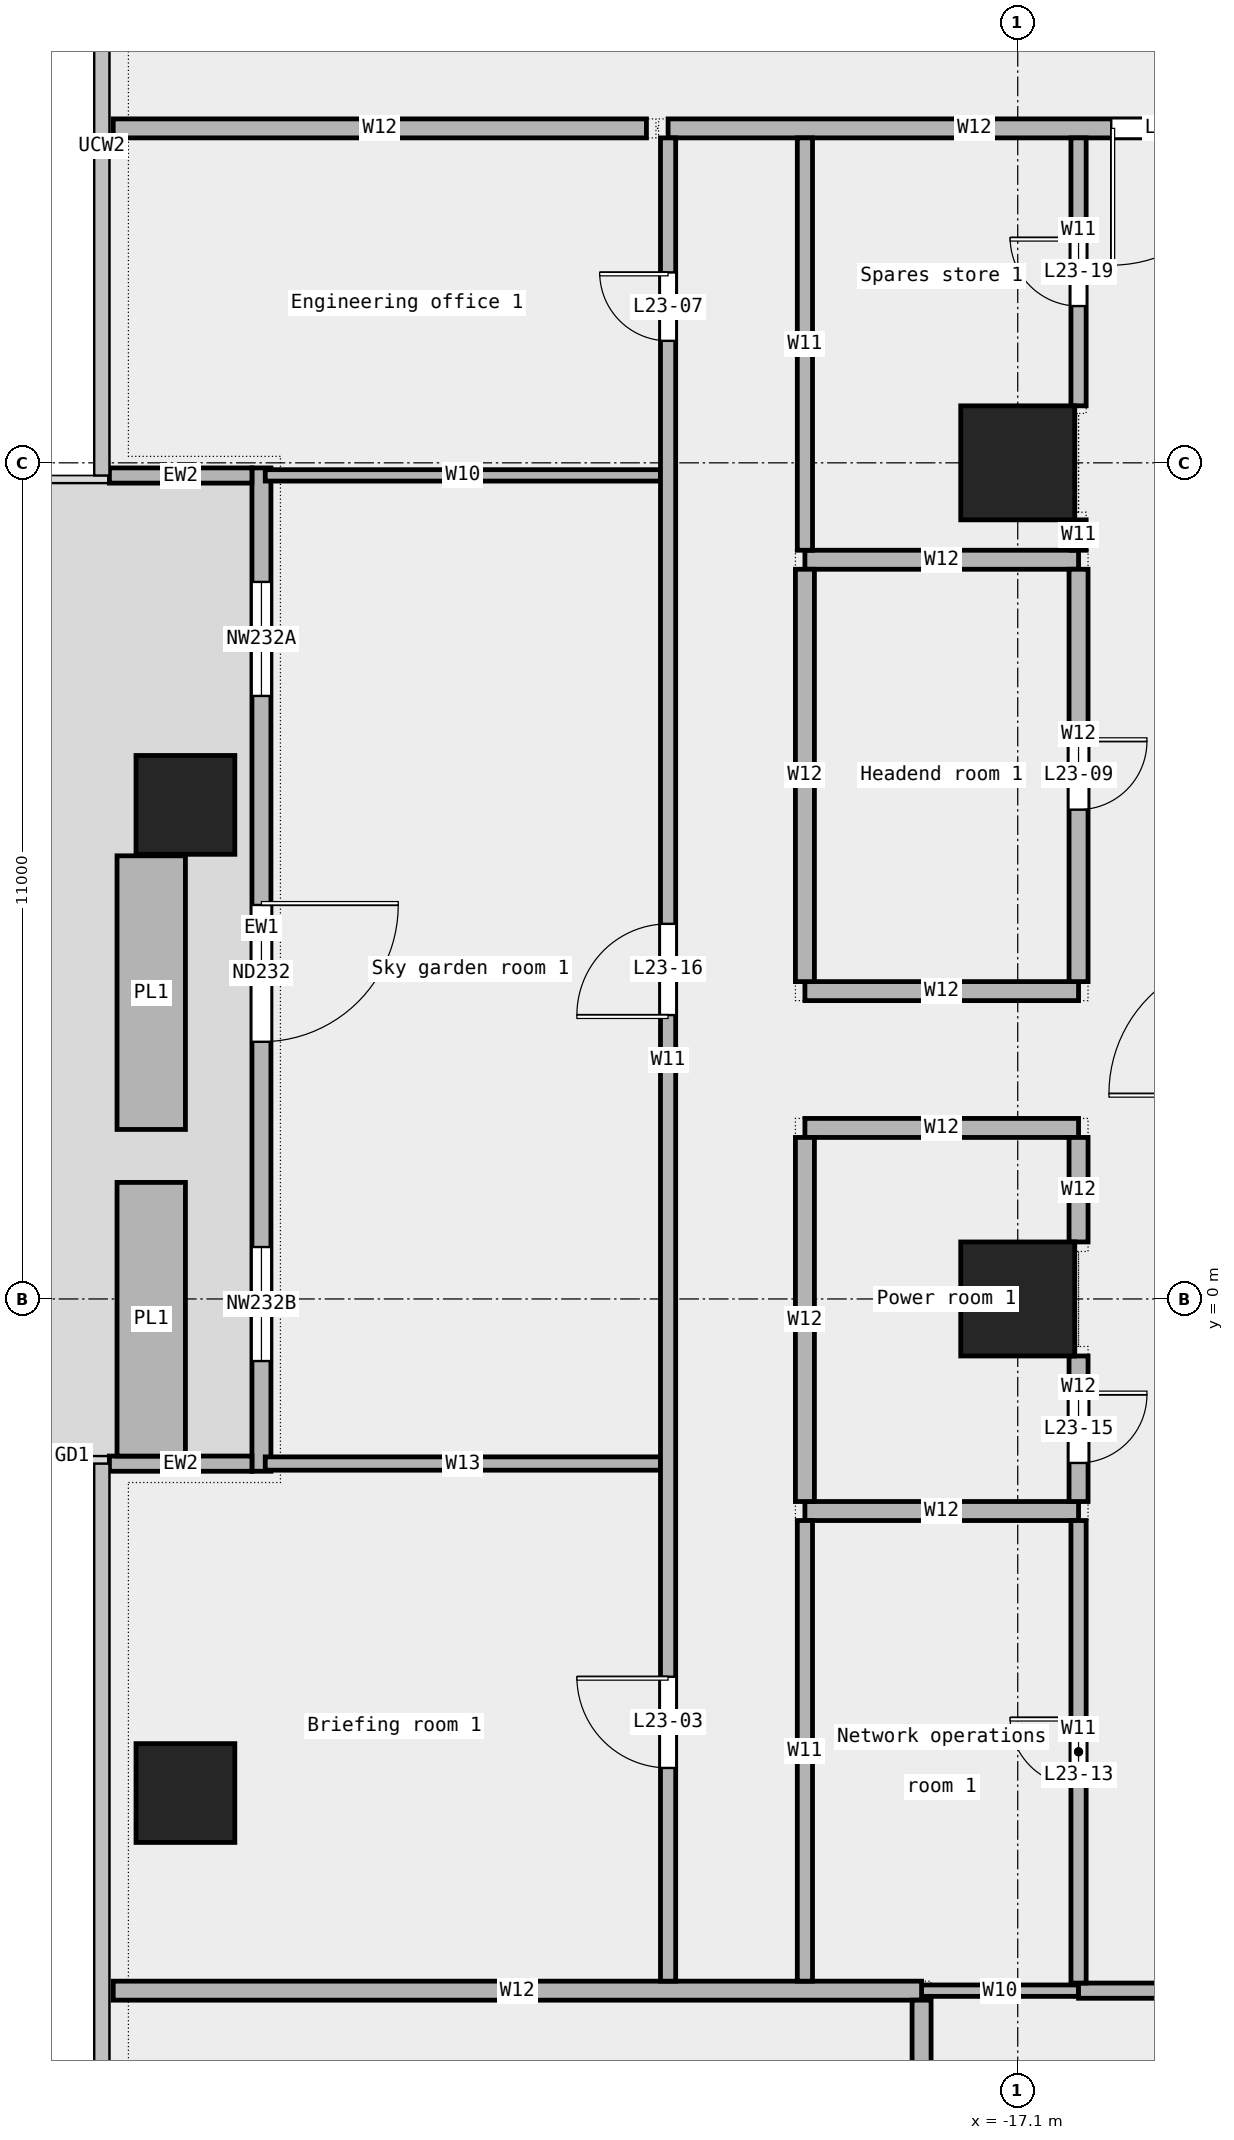
"""IFC4 building model, lengths in metres.
Left out: names, types, materials, properties, quantities, classifications, styles, units other than length and angle.
Written with IfcOpenShell. Run it as: python <this file> out.ifc"""

import sys

from ifc_helpers import new_model, si_unit, direction, frame, frame_2d, origin, origin_2d, place, context, subcontext, project, spatial, rectangle, extrude, element, fill, save


model = new_model("IFC4")
c1 = context("Model", 3, precision=1e-05, world=origin(), true_north=direction((0.0, 1.0)))
c2 = subcontext(c1, "Body", "Model", "MODEL_VIEW")
j1 = project(units=[si_unit("LENGTHUNIT", "METRE"), si_unit("PLANEANGLEUNIT", "RADIAN")], contexts=[c1])
p1 = place(None, origin())
s1 = spatial("IfcSite", under=j1, at=p1, CompositionType="ELEMENT")
p2 = place(p1, origin())
s2 = spatial("IfcBuilding", under=s1, at=p2, CompositionType="ELEMENT")
p3 = place(p2, frame((0.0, 0.0, 117.1)))
s3 = spatial("IfcBuildingStorey", under=s2, at=p3, CompositionType="ELEMENT", Elevation=117.1)
for number, where, z_axis, x_axis in (
    (1, (-28.05, 6.5, 0.0), (0.0, 0.0, 1.0), (1.0, 0.0, 0.0)),
    (2, (-28.05, -6.5, 0.0), (0.0, 0.0, 1.0), (1.0, 0.0, 0.0)),
):
    element("IfcColumn", number, at=place(p3, frame(where, z_axis=z_axis, x_axis=x_axis)), inside=s3, PredefinedType="COLUMN", context=c2, shape_type="SweptSolid", body=[
        extrude(rectangle(XDim=1.3, YDim=1.3, at=origin_2d()), origin(), (0.0, 0.0, 1.0), 4.05),
    ])
for number, where, z_axis, x_axis in (
    (3, (-17.1, 0.0, 0.0), (0.0, 0.0, 1.0), (1.0, 0.0, 0.0)),
    (4, (-17.1, 11.0, 0.0), (0.0, 0.0, 1.0), (1.0, 0.0, 0.0)),
):
    element("IfcColumn", number, at=place(p3, frame(where, z_axis=z_axis, x_axis=x_axis)), inside=s3, PredefinedType="COLUMN", context=c2, shape_type="SweptSolid", body=[
        extrude(rectangle(XDim=1.5, YDim=1.5, at=origin_2d()), origin(), (0.0, 0.0, 1.0), 4.05),
    ])
p4 = place(p3, frame((-27.05, 10.933, 0.0), z_axis=(0.0, 0.0, 1.0), x_axis=(0.0, -1.0, 0.0)))
e5 = element("IfcWall", 5, at=p4, inside=s3, PredefinedType="STANDARD", context=c2, shape_type="SweptSolid", body=[
    extrude(rectangle(XDim=13.2, YDim=0.25, at=frame_2d((6.6, 0.0))), origin(), (0.0, 0.0, 1.0), 4.05),
])
p5 = place(p4, frame((1.5, 0.0, 0.45)))
e6 = element("IfcOpeningElement", 6, at=p5, cuts=e5, PredefinedType="OPENING", context=c2, shape_type="SweptSolid", body=[
    extrude(rectangle(XDim=1.5, YDim=3.0, at=frame_2d((0.75, 1.5))), frame((0.0, 0.137, 0.0), z_axis=(0.0, -1.0, 0.0), x_axis=(1.0, 0.0, 0.0)), (0.0, 0.0, 1.0), 0.274),
])
p6 = place(p4, frame((5.75, 0.0, 0.0)))
e7 = element("IfcOpeningElement", 7, at=p6, cuts=e5, PredefinedType="OPENING", context=c2, shape_type="SweptSolid", body=[
    extrude(rectangle(XDim=1.8, YDim=2.4, at=frame_2d((0.9, 1.2))), frame((0.0, 0.137, 0.0), z_axis=(0.0, -1.0, 0.0), x_axis=(1.0, 0.0, 0.0)), (0.0, 0.0, 1.0), 0.274),
])
p7 = place(p4, frame((10.25, 0.0, 0.45)))
e8 = element("IfcOpeningElement", 8, at=p7, cuts=e5, PredefinedType="OPENING", context=c2, shape_type="SweptSolid", body=[
    extrude(rectangle(XDim=1.5, YDim=3.0, at=frame_2d((0.75, 1.5))), frame((0.0, 0.137, 0.0), z_axis=(0.0, -1.0, 0.0), x_axis=(1.0, 0.0, 0.0)), (0.0, 0.0, 1.0), 0.274),
])
for number, where, z_axis, x_axis in (
    (9, (-29.05, 10.833, 0.0), (0.0, 0.0, 1.0), (1.0, 0.0, 0.0)),
    (10, (-29.05, -2.167, 0.0), (0.0, 0.0, 1.0), (1.0, 0.0, 0.0)),
):
    element("IfcWall", number, at=place(p3, frame(where, z_axis=z_axis, x_axis=x_axis)), inside=s3, PredefinedType="STANDARD", context=c2, shape_type="SweptSolid", body=[
        extrude(rectangle(XDim=1.875, YDim=0.2, at=frame_2d((0.938, 0.0))), origin(), (0.0, 0.0, 1.0), 4.05),
    ])
for number, where, z_axis, x_axis in (
    (11, (-28.5, 5.83, 0.0), (0.0, 0.0, 1.0), (0.0, -1.0, 0.0)),
    (12, (-28.5, 1.533, 0.0), (0.0, 0.0, 1.0), (0.0, -1.0, 0.0)),
):
    element("IfcWall", number, at=place(p3, frame(where, z_axis=z_axis, x_axis=x_axis)), inside=s3, PredefinedType="STANDARD", context=c2, shape_type="SweptSolid", body=[
        extrude(rectangle(XDim=3.6, YDim=0.9, at=frame_2d((1.8, 0.0))), origin(), (0.0, 0.0, 1.0), 0.7),
    ])
p8 = place(p3, frame((-18.365, -9.1, 0.0), z_axis=(0.0, 0.0, 1.0), x_axis=(1.0, 0.0, 0.0)))
e13 = element("IfcWall", 13, at=p8, inside=s3, PredefinedType="PARTITIONING", context=c2, shape_type="SweptSolid", body=[
    extrude(rectangle(XDim=2.065, YDim=0.15, at=frame_2d((1.032, 0.0))), origin(), (0.0, 0.0, 1.0), 4.05),
])
p9 = place(p3, frame((-16.3, -9.1, 0.0), z_axis=(0.0, 0.0, 1.0), x_axis=(1.0, 0.0, 0.0)))
e14 = element("IfcWall", 14, at=p9, inside=s3, PredefinedType="PARTITIONING", context=c2, shape_type="SweptSolid", body=[
    extrude(rectangle(XDim=5.03, YDim=0.2, at=frame_2d((2.515, 0.0))), origin(), (0.0, 0.0, 1.0), 4.05),
])
p10 = place(p3, frame((-29.0, -9.1, 0.0), z_axis=(0.0, 0.0, 1.0), x_axis=(1.0, 0.0, 0.0)))
e15 = element("IfcWall", 15, at=p10, inside=s3, PredefinedType="PARTITIONING", context=c2, shape_type="SweptSolid", body=[
    extrude(rectangle(XDim=10.635, YDim=0.25, at=frame_2d((5.317, 0.0))), origin(), (0.0, 0.0, 1.0), 4.05),
])
p11 = place(p3, frame((-19.9, -2.79, 0.0), z_axis=(0.0, 0.0, 1.0), x_axis=(1.0, 0.0, 0.0)))
e16 = element("IfcWall", 16, at=p11, inside=s3, PredefinedType="PARTITIONING", context=c2, shape_type="SweptSolid", body=[
    extrude(rectangle(XDim=3.6, YDim=0.25, at=frame_2d((1.8, 0.0))), origin(), (0.0, 0.0, 1.0), 4.05),
])
p12 = place(p3, frame((-27.0, -2.165, 0.0), z_axis=(0.0, 0.0, 1.0), x_axis=(1.0, 0.0, 0.0)))
e17 = element("IfcWall", 17, at=p12, inside=s3, PredefinedType="PARTITIONING", context=c2, shape_type="SweptSolid", body=[
    extrude(rectangle(XDim=5.2, YDim=0.175, at=frame_2d((2.6, 0.0))), origin(), (0.0, 0.0, 1.0), 4.05),
])
for number, where, z_axis, x_axis in (
    (18, (-19.9, 2.25, 0.0), (0.0, 0.0, 1.0), (1.0, 0.0, 0.0)),
    (19, (-19.9, 4.05, 0.0), (0.0, 0.0, 1.0), (1.0, 0.0, 0.0)),
    (20, (-19.9, 9.725, 0.0), (0.0, 0.0, 1.0), (1.0, 0.0, 0.0)),
):
    element("IfcWall", number, at=place(p3, frame(where, z_axis=z_axis, x_axis=x_axis)), inside=s3, PredefinedType="PARTITIONING", context=c2, shape_type="SweptSolid", body=[
        extrude(rectangle(XDim=3.6, YDim=0.25, at=frame_2d((1.8, 0.0))), origin(), (0.0, 0.0, 1.0), 4.05),
    ])
p13 = place(p3, frame((-27.0, 10.835, 0.0), z_axis=(0.0, 0.0, 1.0), x_axis=(1.0, 0.0, 0.0)))
e21 = element("IfcWall", 21, at=p13, inside=s3, PredefinedType="PARTITIONING", context=c2, shape_type="SweptSolid", body=[
    extrude(rectangle(XDim=5.2, YDim=0.15, at=frame_2d((2.6, 0.0))), origin(), (0.0, 0.0, 1.0), 4.05),
])
p14 = place(p3, frame((-29.0, 15.4, 0.0), z_axis=(0.0, 0.0, 1.0), x_axis=(1.0, 0.0, 0.0)))
e22 = element("IfcWall", 22, at=p14, inside=s3, PredefinedType="PARTITIONING", context=c2, shape_type="SweptSolid", body=[
    extrude(rectangle(XDim=7.015, YDim=0.25, at=frame_2d((3.507, 0.0))), origin(), (0.0, 0.0, 1.0), 4.05),
])
p15 = place(p3, frame((-21.7, 15.4, 0.0), z_axis=(0.0, 0.0, 1.0), x_axis=(1.0, 0.0, 0.0)))
e23 = element("IfcWall", 23, at=p15, inside=s3, PredefinedType="PARTITIONING", context=c2, shape_type="SweptSolid", body=[
    extrude(rectangle(XDim=8.06, YDim=0.25, at=frame_2d((4.03, 0.0))), origin(), (0.0, 0.0, 1.0), 4.05),
])
p16 = place(p15, frame((5.83, 0.0, 0.0)))
e24 = element("IfcOpeningElement", 24, at=p16, cuts=e23, PredefinedType="OPENING", context=c2, shape_type="SweptSolid", body=[
    extrude(rectangle(XDim=1.8, YDim=2.1, at=frame_2d((0.9, 1.05))), frame((0.0, 0.137, 0.0), z_axis=(0.0, -1.0, 0.0), x_axis=(1.0, 0.0, 0.0)), (0.0, 0.0, 1.0), 0.274),
])
p17 = place(p3, frame((-21.7, -8.975, 0.0), z_axis=(0.0, 0.0, 1.0), x_axis=(0.0, 1.0, 0.0)))
e25 = element("IfcWall", 25, at=p17, inside=s3, PredefinedType="PARTITIONING", context=c2, shape_type="SweptSolid", body=[
    extrude(rectangle(XDim=24.25, YDim=0.2, at=frame_2d((12.125, 0.0))), origin(), (0.0, 0.0, 1.0), 4.05),
])
p18 = place(p17, frame((2.805, 0.0, 0.0)))
e26 = element("IfcOpeningElement", 26, at=p18, cuts=e25, PredefinedType="OPENING", context=c2, shape_type="SweptSolid", body=[
    extrude(rectangle(XDim=1.2, YDim=2.1, at=frame_2d((0.6, 1.05))), frame((0.0, 0.112, 0.0), z_axis=(0.0, -1.0, 0.0), x_axis=(1.0, 0.0, 0.0)), (0.0, 0.0, 1.0), 0.224),
])
p19 = place(p17, frame((21.58, 0.0, 0.0)))
e27 = element("IfcOpeningElement", 27, at=p19, cuts=e25, PredefinedType="OPENING", context=c2, shape_type="SweptSolid", body=[
    extrude(rectangle(XDim=0.9, YDim=2.1, at=frame_2d((0.45, 1.05))), frame((0.0, 0.112, 0.0), z_axis=(0.0, -1.0, 0.0), x_axis=(1.0, 0.0, 0.0)), (0.0, 0.0, 1.0), 0.224),
])
p20 = place(p17, frame((12.71, 0.0, 0.0)))
e28 = element("IfcOpeningElement", 28, at=p20, cuts=e25, PredefinedType="OPENING", context=c2, shape_type="SweptSolid", body=[
    extrude(rectangle(XDim=1.2, YDim=2.1, at=frame_2d((0.6, 1.05))), frame((0.0, 0.112, 0.0), z_axis=(0.0, -1.0, 0.0), x_axis=(1.0, 0.0, 0.0)), (0.0, 0.0, 1.0), 0.224),
])
p21 = place(p3, frame((-19.9, -8.975, 0.0), z_axis=(0.0, 0.0, 1.0), x_axis=(0.0, 1.0, 0.0)))
e29 = element("IfcWall", 29, at=p21, inside=s3, PredefinedType="PARTITIONING", context=c2, shape_type="SweptSolid", body=[
    extrude(rectangle(XDim=6.06, YDim=0.2, at=frame_2d((3.03, 0.0))), origin(), (0.0, 0.0, 1.0), 4.05),
])
p22 = place(p3, frame((-19.9, 9.85, 0.0), z_axis=(0.0, 0.0, 1.0), x_axis=(0.0, 1.0, 0.0)))
e30 = element("IfcWall", 30, at=p22, inside=s3, PredefinedType="PARTITIONING", context=c2, shape_type="SweptSolid", body=[
    extrude(rectangle(XDim=5.425, YDim=0.2, at=frame_2d((2.712, 0.0))), origin(), (0.0, 0.0, 1.0), 4.05),
])
p23 = place(p3, frame((-19.9, -2.665, 0.0), z_axis=(0.0, 0.0, 1.0), x_axis=(0.0, 1.0, 0.0)))
e31 = element("IfcWall", 31, at=p23, inside=s3, PredefinedType="PARTITIONING", context=c2, shape_type="SweptSolid", body=[
    extrude(rectangle(XDim=4.79, YDim=0.25, at=frame_2d((2.395, 0.0))), origin(), (0.0, 0.0, 1.0), 4.05),
])
p24 = place(p3, frame((-19.9, 4.175, 0.0), z_axis=(0.0, 0.0, 1.0), x_axis=(0.0, 1.0, 0.0)))
e32 = element("IfcWall", 32, at=p24, inside=s3, PredefinedType="PARTITIONING", context=c2, shape_type="SweptSolid", body=[
    extrude(rectangle(XDim=5.425, YDim=0.25, at=frame_2d((2.712, 0.0))), origin(), (0.0, 0.0, 1.0), 4.05),
])
p25 = place(p3, frame((-18.365, -14.825, 0.0), z_axis=(0.0, 0.0, 1.0), x_axis=(0.0, 1.0, 0.0)))
e33 = element("IfcWall", 33, at=p25, inside=s3, PredefinedType="PARTITIONING", context=c2, shape_type="SweptSolid", body=[
    extrude(rectangle(XDim=5.6, YDim=0.25, at=frame_2d((2.8, 0.0))), origin(), (0.0, 0.0, 1.0), 4.05),
])
p26 = place(p3, frame((-16.3, -9.0, 0.0), z_axis=(0.0, 0.0, 1.0), x_axis=(0.0, 1.0, 0.0)))
e34 = element("IfcWall", 34, at=p26, inside=s3, PredefinedType="PARTITIONING", context=c2, shape_type="SweptSolid", body=[
    extrude(rectangle(XDim=6.085, YDim=0.2, at=frame_2d((3.042, 0.0))), origin(), (0.0, 0.0, 1.0), 4.05),
])
p27 = place(p26, frame((2.593, 0.0, 0.0)))
e35 = element("IfcOpeningElement", 35, at=p27, cuts=e34, PredefinedType="OPENING", context=c2, shape_type="SweptSolid", body=[
    extrude(rectangle(XDim=0.9, YDim=2.1, at=frame_2d((0.45, 1.05))), frame((0.0, 0.112, 0.0), z_axis=(0.0, -1.0, 0.0), x_axis=(1.0, 0.0, 0.0)), (0.0, 0.0, 1.0), 0.224),
])
p28 = place(p3, frame((-16.3, 9.85, 0.0), z_axis=(0.0, 0.0, 1.0), x_axis=(0.0, 1.0, 0.0)))
e36 = element("IfcWall", 36, at=p28, inside=s3, PredefinedType="PARTITIONING", context=c2, shape_type="SweptSolid", body=[
    extrude(rectangle(XDim=0.4, YDim=0.2, at=frame_2d((0.2, 0.0))), origin(), (0.0, 0.0, 1.0), 4.05),
])
p29 = place(p3, frame((-16.3, 11.75, 0.0), z_axis=(0.0, 0.0, 1.0), x_axis=(0.0, 1.0, 0.0)))
e37 = element("IfcWall", 37, at=p29, inside=s3, PredefinedType="PARTITIONING", context=c2, shape_type="SweptSolid", body=[
    extrude(rectangle(XDim=3.525, YDim=0.2, at=frame_2d((1.762, 0.0))), origin(), (0.0, 0.0, 1.0), 4.05),
])
p30 = place(p29, frame((1.312, 0.0, 0.0)))
e38 = element("IfcOpeningElement", 38, at=p30, cuts=e37, PredefinedType="OPENING", context=c2, shape_type="SweptSolid", body=[
    extrude(rectangle(XDim=0.9, YDim=2.1, at=frame_2d((0.45, 1.05))), frame((0.0, 0.112, 0.0), z_axis=(0.0, -1.0, 0.0), x_axis=(1.0, 0.0, 0.0)), (0.0, 0.0, 1.0), 0.224),
])
p31 = place(p3, frame((-16.3, -2.665, 0.0), z_axis=(0.0, 0.0, 1.0), x_axis=(0.0, 1.0, 0.0)))
e39 = element("IfcWall", 39, at=p31, inside=s3, PredefinedType="PARTITIONING", context=c2, shape_type="SweptSolid", body=[
    extrude(rectangle(XDim=1.915, YDim=0.25, at=frame_2d((0.958, 0.0))), origin(), (0.0, 0.0, 1.0), 4.05),
])
p32 = place(p31, frame((0.508, 0.0, 0.0)))
e40 = element("IfcOpeningElement", 40, at=p32, cuts=e39, PredefinedType="OPENING", context=c2, shape_type="SweptSolid", body=[
    extrude(rectangle(XDim=0.9, YDim=2.1, at=frame_2d((0.45, 1.05))), frame((0.0, 0.137, 0.0), z_axis=(0.0, -1.0, 0.0), x_axis=(1.0, 0.0, 0.0)), (0.0, 0.0, 1.0), 0.274),
])
p33 = place(p3, frame((-16.3, 0.75, 0.0), z_axis=(0.0, 0.0, 1.0), x_axis=(0.0, 1.0, 0.0)))
e41 = element("IfcWall", 41, at=p33, inside=s3, PredefinedType="PARTITIONING", context=c2, shape_type="SweptSolid", body=[
    extrude(rectangle(XDim=1.375, YDim=0.25, at=frame_2d((0.688, 0.0))), origin(), (0.0, 0.0, 1.0), 4.05),
])
p34 = place(p3, frame((-16.3, 4.175, 0.0), z_axis=(0.0, 0.0, 1.0), x_axis=(0.0, 1.0, 0.0)))
e42 = element("IfcWall", 42, at=p34, inside=s3, PredefinedType="PARTITIONING", context=c2, shape_type="SweptSolid", body=[
    extrude(rectangle(XDim=5.425, YDim=0.25, at=frame_2d((2.712, 0.0))), origin(), (0.0, 0.0, 1.0), 4.05),
])
p35 = place(p34, frame((2.262, 0.0, 0.0)))
e43 = element("IfcOpeningElement", 43, at=p35, cuts=e42, PredefinedType="OPENING", context=c2, shape_type="SweptSolid", body=[
    extrude(rectangle(XDim=0.9, YDim=2.1, at=frame_2d((0.45, 1.05))), frame((0.0, 0.137, 0.0), z_axis=(0.0, -1.0, 0.0), x_axis=(1.0, 0.0, 0.0)), (0.0, 0.0, 1.0), 0.274),
])
p36 = place(p5, origin())
e44 = element("IfcWindow", 44, at=p36, inside=s3, PartitioningType="SINGLE_PANEL", PredefinedType="WINDOW", context=c2, shape_type="SweptSolid", body=[
    extrude(rectangle(XDim=1.5, YDim=3.0, at=frame_2d((0.75, 1.5))), frame((0.0, 0.03, 0.0), z_axis=(0.0, -1.0, 0.0), x_axis=(1.0, 0.0, 0.0)), (0.0, 0.0, 1.0), 0.06),
])
fill(e6, e44)
p37 = place(p6, origin())
e45 = element("IfcDoor", 45, at=p37, inside=s3, OperationType="DOUBLE_DOOR_SINGLE_SWING", PredefinedType="DOOR", context=c2, shape_type="SweptSolid", body=[
    extrude(rectangle(XDim=1.8, YDim=2.4, at=frame_2d((0.9, 1.2))), frame((0.0, 0.025, 0.0), z_axis=(0.0, -1.0, 0.0), x_axis=(1.0, 0.0, 0.0)), (0.0, 0.0, 1.0), 0.05),
])
fill(e7, e45)
p38 = place(p7, origin())
e46 = element("IfcWindow", 46, at=p38, inside=s3, PartitioningType="SINGLE_PANEL", PredefinedType="WINDOW", context=c2, shape_type="SweptSolid", body=[
    extrude(rectangle(XDim=1.5, YDim=3.0, at=frame_2d((0.75, 1.5))), frame((0.0, 0.03, 0.0), z_axis=(0.0, -1.0, 0.0), x_axis=(1.0, 0.0, 0.0)), (0.0, 0.0, 1.0), 0.06),
])
fill(e8, e46)
p39 = place(p18, origin())
e47 = element("IfcDoor", 47, at=p39, inside=s3, OperationType="SINGLE_SWING_RIGHT", PredefinedType="DOOR", context=c2, shape_type="SweptSolid", body=[
    extrude(rectangle(XDim=1.2, YDim=2.1, at=frame_2d((0.6, 1.05))), frame((0.0, 0.025, 0.0), z_axis=(0.0, -1.0, 0.0), x_axis=(1.0, 0.0, 0.0)), (0.0, 0.0, 1.0), 0.05),
])
fill(e26, e47)
p40 = place(p19, origin())
e48 = element("IfcDoor", 48, at=p40, inside=s3, OperationType="SINGLE_SWING_RIGHT", PredefinedType="DOOR", context=c2, shape_type="SweptSolid", body=[
    extrude(rectangle(XDim=0.9, YDim=2.1, at=frame_2d((0.45, 1.05))), frame((0.0, 0.025, 0.0), z_axis=(0.0, -1.0, 0.0), x_axis=(1.0, 0.0, 0.0)), (0.0, 0.0, 1.0), 0.05),
])
fill(e27, e48)
p41 = place(p35, origin())
e49 = element("IfcDoor", 49, at=p41, inside=s3, OperationType="SINGLE_SWING_LEFT", PredefinedType="DOOR", context=c2, shape_type="SweptSolid", body=[
    extrude(rectangle(XDim=0.9, YDim=2.1, at=frame_2d((0.45, 1.05))), frame((0.0, 0.025, 0.0), z_axis=(0.0, -1.0, 0.0), x_axis=(1.0, 0.0, 0.0)), (0.0, 0.0, 1.0), 0.05),
])
fill(e43, e49)
p42 = place(p16, origin())
e50 = element("IfcDoor", 50, at=p42, inside=s3, OperationType="DOUBLE_DOOR_SINGLE_SWING", PredefinedType="DOOR", context=c2, shape_type="SweptSolid", body=[
    extrude(rectangle(XDim=1.8, YDim=2.1, at=frame_2d((0.9, 1.05))), frame((0.0, 0.025, 0.0), z_axis=(0.0, -1.0, 0.0), x_axis=(1.0, 0.0, 0.0)), (0.0, 0.0, 1.0), 0.05),
])
fill(e24, e50)
p43 = place(p27, origin())
e51 = element("IfcDoor", 51, at=p43, inside=s3, OperationType="SINGLE_SWING_RIGHT", PredefinedType="DOOR", context=c2, shape_type="SweptSolid", body=[
    extrude(rectangle(XDim=0.9, YDim=2.1, at=frame_2d((0.45, 1.05))), frame((0.0, 0.025, 0.0), z_axis=(0.0, -1.0, 0.0), x_axis=(1.0, 0.0, 0.0)), (0.0, 0.0, 1.0), 0.05),
])
fill(e35, e51)
p44 = place(p32, origin())
e52 = element("IfcDoor", 52, at=p44, inside=s3, OperationType="SINGLE_SWING_LEFT", PredefinedType="DOOR", context=c2, shape_type="SweptSolid", body=[
    extrude(rectangle(XDim=0.9, YDim=2.1, at=frame_2d((0.45, 1.05))), frame((0.0, 0.025, 0.0), z_axis=(0.0, -1.0, 0.0), x_axis=(1.0, 0.0, 0.0)), (0.0, 0.0, 1.0), 0.05),
])
fill(e40, e52)
p45 = place(p20, origin())
e53 = element("IfcDoor", 53, at=p45, inside=s3, OperationType="SINGLE_SWING_LEFT", PredefinedType="DOOR", context=c2, shape_type="SweptSolid", body=[
    extrude(rectangle(XDim=1.2, YDim=2.1, at=frame_2d((0.6, 1.05))), frame((0.0, 0.025, 0.0), z_axis=(0.0, -1.0, 0.0), x_axis=(1.0, 0.0, 0.0)), (0.0, 0.0, 1.0), 0.05),
])
fill(e28, e53)
p46 = place(p30, origin())
e54 = element("IfcDoor", 54, at=p46, inside=s3, OperationType="SINGLE_SWING_RIGHT", PredefinedType="DOOR", context=c2, shape_type="SweptSolid", body=[
    extrude(rectangle(XDim=0.9, YDim=2.1, at=frame_2d((0.45, 1.05))), frame((0.0, 0.025, 0.0), z_axis=(0.0, -1.0, 0.0), x_axis=(1.0, 0.0, 0.0)), (0.0, 0.0, 1.0), 0.05),
])
fill(e38, e54)
save(model, sys.argv[1])
